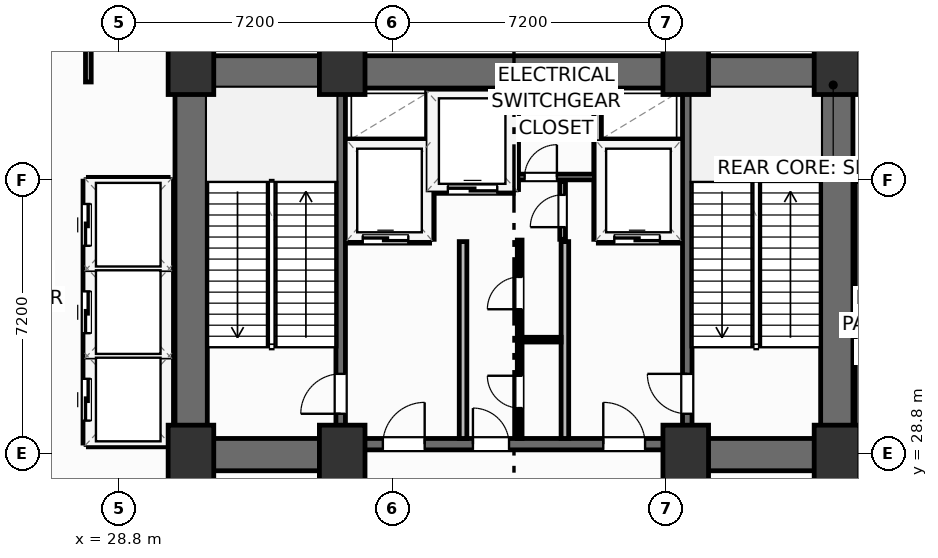
"""IFC4 building model, lengths in metres.
Left out: names, types, materials, properties, quantities, classifications, styles, units other than length and angle.
Written with IfcOpenShell. Run it as: python <this file> out.ifc"""

import sys

from ifc_helpers import new_model, si_unit, direction, frame, frame_2d, origin, origin_2d, place, context, subcontext, project, spatial, rectangle, extrude, element, fill, save


model = new_model("IFC4")
c1 = context("Model", 3, precision=1e-05, world=origin(), true_north=direction((0.0, 1.0)))
c2 = subcontext(c1, "Body", "Model", "MODEL_VIEW")
j1 = project(units=[si_unit("LENGTHUNIT", "METRE"), si_unit("PLANEANGLEUNIT", "RADIAN")], contexts=[c1])
p1 = place(None, origin())
s1 = spatial("IfcSite", under=j1, at=p1, CompositionType="ELEMENT")
p2 = place(p1, origin())
s2 = spatial("IfcBuilding", under=s1, at=p2, CompositionType="ELEMENT")
p3 = place(p2, frame((0.0, 0.0, 10.8)))
s3 = spatial("IfcBuildingStorey", under=s2, at=p3, CompositionType="ELEMENT", Elevation=10.8)
for number, where, z_axis, x_axis in (
    (1, (30.7, 28.75, 0.0), (0.0, 0.0, 1.0), (1.0, 0.0, 0.0)),
    (2, (34.68, 28.75, 0.0), (0.0, 0.0, 1.0), (1.0, 0.0, 0.0)),
    (3, (43.72, 28.75, 0.0), (0.0, 0.0, 1.0), (1.0, 0.0, 0.0)),
    (4, (47.7, 28.75, 0.0), (0.0, 0.0, 1.0), (1.0, 0.0, 0.0)),
    (5, (30.7, 39.05, 0.0), (0.0, 0.0, 1.0), (1.0, 0.0, 0.0)),
    (6, (34.68, 39.05, 0.0), (0.0, 0.0, 1.0), (1.0, 0.0, 0.0)),
    (7, (43.72, 39.05, 0.0), (0.0, 0.0, 1.0), (1.0, 0.0, 0.0)),
    (8, (47.7, 39.05, 0.0), (0.0, 0.0, 1.0), (1.0, 0.0, 0.0)),
):
    element("IfcColumn", number, at=place(p3, frame(where, z_axis=z_axis, x_axis=x_axis)), inside=s3, PredefinedType="COLUMN", context=c2, shape_type="SweptSolid", body=[
        extrude(rectangle(XDim=1.2, YDim=1.6, at=origin_2d()), origin(), (0.0, 0.0, 1.0), 5.4),
    ])
p4 = place(p3, frame((30.28, 38.845, 0.0), z_axis=(0.0, 0.0, 1.0), x_axis=(1.0, 0.0, 0.0)))
e9 = element("IfcWall", 9, at=p4, inside=s3, PredefinedType="SHEAR", context=c2, shape_type="SweptSolid", body=[
    extrude(rectangle(XDim=17.84, YDim=0.85, at=frame_2d((8.92, 0.0))), origin(), (0.0, 0.0, 1.0), 5.12),
])
for number, where, z_axis, x_axis in (
    (10, (30.705, 29.2, 0.0), (0.0, 0.0, 1.0), (0.0, 1.0, 0.0)),
    (11, (47.695, 29.2, 0.0), (0.0, 0.0, 1.0), (0.0, 1.0, 0.0)),
):
    element("IfcWall", number, at=place(p3, frame(where, z_axis=z_axis, x_axis=x_axis)), inside=s3, PredefinedType="SHEAR", context=c2, shape_type="SweptSolid", body=[
        extrude(rectangle(XDim=9.22, YDim=0.85, at=frame_2d((4.61, 0.0))), origin(), (0.0, 0.0, 1.0), 5.12),
    ])
for number, where, z_axis, x_axis in (
    (12, (30.28, 28.775, 0.0), (0.0, 0.0, 1.0), (1.0, 0.0, 0.0)),
    (13, (43.6, 28.775, 0.0), (0.0, 0.0, 1.0), (1.0, 0.0, 0.0)),
):
    element("IfcWall", number, at=place(p3, frame(where, z_axis=z_axis, x_axis=x_axis)), inside=s3, PredefinedType="SHEAR", context=c2, shape_type="SweptSolid", body=[
        extrude(rectangle(XDim=4.52, YDim=0.85, at=frame_2d((2.26, 0.0))), origin(), (0.0, 0.0, 1.0), 5.12),
    ])
p5 = place(p3, frame((34.8, 29.05, 0.0), z_axis=(0.0, 0.0, 1.0), x_axis=(1.0, 0.0, 0.0)))
e14 = element("IfcWall", 14, at=p5, inside=s3, PredefinedType="SHEAR", context=c2, shape_type="SweptSolid", body=[
    extrude(rectangle(XDim=8.8, YDim=0.3, at=frame_2d((4.4, 0.0))), origin(), (0.0, 0.0, 1.0), 5.12),
])
p6 = place(p5, frame((0.95, 0.0, 0.0)))
e15 = element("IfcOpeningElement", 15, at=p6, cuts=e14, PredefinedType="OPENING", context=c2, shape_type="SweptSolid", body=[
    extrude(rectangle(XDim=1.1, YDim=2.15, at=frame_2d((0.55, 1.075))), frame((0.0, 0.16, 0.0), z_axis=(0.0, -1.0, 0.0), x_axis=(1.0, 0.0, 0.0)), (0.0, 0.0, 1.0), 0.32),
])
p7 = place(p5, frame((6.75, 0.0, 0.0)))
e16 = element("IfcOpeningElement", 16, at=p7, cuts=e14, PredefinedType="OPENING", context=c2, shape_type="SweptSolid", body=[
    extrude(rectangle(XDim=1.1, YDim=2.15, at=frame_2d((0.55, 1.075))), frame((0.0, 0.16, 0.0), z_axis=(0.0, -1.0, 0.0), x_axis=(1.0, 0.0, 0.0)), (0.0, 0.0, 1.0), 0.32),
])
p8 = place(p5, frame((3.32, 0.0, 0.0)))
e17 = element("IfcOpeningElement", 17, at=p8, cuts=e14, PredefinedType="OPENING", context=c2, shape_type="SweptSolid", body=[
    extrude(rectangle(XDim=0.95, YDim=2.15, at=frame_2d((0.475, 1.075))), frame((0.0, 0.16, 0.0), z_axis=(0.0, -1.0, 0.0), x_axis=(1.0, 0.0, 0.0)), (0.0, 0.0, 1.0), 0.32),
])
p9 = place(p3, frame((34.64, 29.2, 0.0), z_axis=(0.0, 0.0, 1.0), x_axis=(0.0, 1.0, 0.0)))
e18 = element("IfcWall", 18, at=p9, inside=s3, PredefinedType="SHEAR", context=c2, shape_type="SweptSolid", body=[
    extrude(rectangle(XDim=9.22, YDim=0.25, at=frame_2d((4.61, 0.0))), origin(), (0.0, 0.0, 1.0), 5.12),
])
p10 = place(p9, frame((0.65, 0.0, 0.0)))
e19 = element("IfcOpeningElement", 19, at=p10, cuts=e18, PredefinedType="OPENING", context=c2, shape_type="SweptSolid", body=[
    extrude(rectangle(XDim=1.05, YDim=2.15, at=frame_2d((0.525, 1.075))), frame((0.0, 0.135, 0.0), z_axis=(0.0, -1.0, 0.0), x_axis=(1.0, 0.0, 0.0)), (0.0, 0.0, 1.0), 0.27),
])
p11 = place(p3, frame((43.76, 29.2, 0.0), z_axis=(0.0, 0.0, 1.0), x_axis=(0.0, 1.0, 0.0)))
e20 = element("IfcWall", 20, at=p11, inside=s3, PredefinedType="SHEAR", context=c2, shape_type="SweptSolid", body=[
    extrude(rectangle(XDim=9.22, YDim=0.25, at=frame_2d((4.61, 0.0))), origin(), (0.0, 0.0, 1.0), 5.12),
])
p12 = place(p11, frame((0.65, 0.0, 0.0)))
e21 = element("IfcOpeningElement", 21, at=p12, cuts=e20, PredefinedType="OPENING", context=c2, shape_type="SweptSolid", body=[
    extrude(rectangle(XDim=1.05, YDim=2.15, at=frame_2d((0.525, 1.075))), frame((0.0, 0.135, 0.0), z_axis=(0.0, -1.0, 0.0), x_axis=(1.0, 0.0, 0.0)), (0.0, 0.0, 1.0), 0.27),
])
p13 = place(p3, frame((48.12, 38.58, 0.0), z_axis=(0.0, 0.0, 1.0), x_axis=(1.0, 0.0, 0.0)))
e22 = element("IfcWall", 22, at=p13, inside=s3, PredefinedType="PARTITIONING", context=c2, shape_type="SweptSolid", body=[
    extrude(rectangle(XDim=2.4, YDim=0.15, at=frame_2d((1.2, 0.0))), origin(), (0.0, 0.0, 1.0), 4.085),
])
p14 = place(p3, frame((28.0, 38.58, 0.0), z_axis=(0.0, 0.0, 1.0), x_axis=(0.0, 1.0, 0.0)))
e23 = element("IfcWall", 23, at=p14, inside=s3, PredefinedType="PARTITIONING", context=c2, shape_type="SweptSolid", body=[
    extrude(rectangle(XDim=11.62, YDim=0.15, at=frame_2d((5.81, 0.0))), origin(), (0.0, 0.0, 1.0), 5.12),
])
for number, where, z_axis, x_axis in (
    (24, (37.86, 29.2, 0.0), (0.0, 0.0, 1.0), (0.0, 1.0, 0.0)),
    (25, (40.54, 29.2, 0.0), (0.0, 0.0, 1.0), (0.0, 1.0, 0.0)),
):
    element("IfcWall", number, at=place(p3, frame(where, z_axis=z_axis, x_axis=x_axis)), inside=s3, PredefinedType="PARTITIONING", context=c2, shape_type="SweptSolid", body=[
        extrude(rectangle(XDim=5.18, YDim=0.2, at=frame_2d((2.59, 0.0))), origin(), (0.0, 0.0, 1.0), 5.12),
    ])
p15 = place(p3, frame((34.8, 34.44, 0.0), z_axis=(0.0, 0.0, 1.0), x_axis=(1.0, 0.0, 0.0)))
e26 = element("IfcWall", 26, at=p15, inside=s3, PredefinedType="PARTITIONING", context=c2, shape_type="SweptSolid", body=[
    extrude(rectangle(XDim=2.18, YDim=0.2, at=frame_2d((1.09, 0.0))), origin(), (0.0, 0.0, 1.0), 5.12),
])
p16 = place(p15, frame((0.42, 0.0, 0.0)))
e27 = element("IfcOpeningElement", 27, at=p16, cuts=e26, PredefinedType="OPENING", context=c2, shape_type="SweptSolid", body=[
    extrude(rectangle(XDim=1.2, YDim=2.2, at=frame_2d((0.6, 1.1))), frame((0.0, 0.11, 0.0), z_axis=(0.0, -1.0, 0.0), x_axis=(1.0, 0.0, 0.0)), (0.0, 0.0, 1.0), 0.22),
])
p17 = place(p3, frame((34.8, 36.98, 0.0), z_axis=(0.0, 0.0, 1.0), x_axis=(1.0, 0.0, 0.0)))
e28 = element("IfcWall", 28, at=p17, inside=s3, PredefinedType="PARTITIONING", context=c2, shape_type="SweptSolid", body=[
    extrude(rectangle(XDim=2.18, YDim=0.2, at=frame_2d((1.09, 0.0))), origin(), (0.0, 0.0, 1.0), 5.12),
])
p18 = place(p3, frame((37.0, 34.44, 0.0), z_axis=(0.0, 0.0, 1.0), x_axis=(0.0, 1.0, 0.0)))
e29 = element("IfcWall", 29, at=p18, inside=s3, PredefinedType="PARTITIONING", context=c2, shape_type="SweptSolid", body=[
    extrude(rectangle(XDim=3.9, YDim=0.2, at=frame_2d((1.95, 0.0))), origin(), (0.0, 0.0, 1.0), 5.12),
])
p19 = place(p3, frame((41.42, 34.44, 0.0), z_axis=(0.0, 0.0, 1.0), x_axis=(1.0, 0.0, 0.0)))
e30 = element("IfcWall", 30, at=p19, inside=s3, PredefinedType="PARTITIONING", context=c2, shape_type="SweptSolid", body=[
    extrude(rectangle(XDim=2.18, YDim=0.2, at=frame_2d((1.09, 0.0))), origin(), (0.0, 0.0, 1.0), 5.12),
])
p20 = place(p19, frame((0.42, 0.0, 0.0)))
e31 = element("IfcOpeningElement", 31, at=p20, cuts=e30, PredefinedType="OPENING", context=c2, shape_type="SweptSolid", body=[
    extrude(rectangle(XDim=1.2, YDim=2.2, at=frame_2d((0.6, 1.1))), frame((0.0, 0.11, 0.0), z_axis=(0.0, -1.0, 0.0), x_axis=(1.0, 0.0, 0.0)), (0.0, 0.0, 1.0), 0.22),
])
p21 = place(p3, frame((41.42, 36.98, 0.0), z_axis=(0.0, 0.0, 1.0), x_axis=(1.0, 0.0, 0.0)))
e32 = element("IfcWall", 32, at=p21, inside=s3, PredefinedType="PARTITIONING", context=c2, shape_type="SweptSolid", body=[
    extrude(rectangle(XDim=2.18, YDim=0.2, at=frame_2d((1.09, 0.0))), origin(), (0.0, 0.0, 1.0), 5.12),
])
p22 = place(p3, frame((41.4, 34.44, 0.0), z_axis=(0.0, 0.0, 1.0), x_axis=(0.0, 1.0, 0.0)))
e33 = element("IfcWall", 33, at=p22, inside=s3, PredefinedType="PARTITIONING", context=c2, shape_type="SweptSolid", body=[
    extrude(rectangle(XDim=3.9, YDim=0.2, at=frame_2d((1.95, 0.0))), origin(), (0.0, 0.0, 1.0), 5.12),
])
p23 = place(p3, frame((37.06, 35.75, 0.0), z_axis=(0.0, 0.0, 1.0), x_axis=(1.0, 0.0, 0.0)))
e34 = element("IfcWall", 34, at=p23, inside=s3, PredefinedType="PARTITIONING", context=c2, shape_type="SweptSolid", body=[
    extrude(rectangle(XDim=2.12, YDim=0.2, at=frame_2d((1.06, 0.0))), origin(), (0.0, 0.0, 1.0), 5.12),
])
p24 = place(p23, frame((0.4, 0.0, 0.0)))
e35 = element("IfcOpeningElement", 35, at=p24, cuts=e34, PredefinedType="OPENING", context=c2, shape_type="SweptSolid", body=[
    extrude(rectangle(XDim=1.3, YDim=2.2, at=frame_2d((0.65, 1.1))), frame((0.0, 0.11, 0.0), z_axis=(0.0, -1.0, 0.0), x_axis=(1.0, 0.0, 0.0)), (0.0, 0.0, 1.0), 0.22),
])
p25 = place(p3, frame((39.22, 35.75, 0.0), z_axis=(0.0, 0.0, 1.0), x_axis=(0.0, 1.0, 0.0)))
e36 = element("IfcWall", 36, at=p25, inside=s3, PredefinedType="PARTITIONING", context=c2, shape_type="SweptSolid", body=[
    extrude(rectangle(XDim=2.59, YDim=0.2, at=frame_2d((1.295, 0.0))), origin(), (0.0, 0.0, 1.0), 5.12),
])
p26 = place(p3, frame((39.3, 36.08, 0.0), z_axis=(0.0, 0.0, 1.0), x_axis=(1.0, 0.0, 0.0)))
e37 = element("IfcWall", 37, at=p26, inside=s3, PredefinedType="PARTITIONING", context=c2, shape_type="SweptSolid", body=[
    extrude(rectangle(XDim=2.02, YDim=0.15, at=frame_2d((1.01, 0.0))), origin(), (0.0, 0.0, 1.0), 5.12),
])
p27 = place(p26, frame((0.18, 0.0, 0.0)))
e38 = element("IfcOpeningElement", 38, at=p27, cuts=e37, PredefinedType="OPENING", context=c2, shape_type="SweptSolid", body=[
    extrude(rectangle(XDim=0.85, YDim=2.05, at=frame_2d((0.425, 1.025))), frame((0.0, 0.085, 0.0), z_axis=(0.0, -1.0, 0.0), x_axis=(1.0, 0.0, 0.0)), (0.0, 0.0, 1.0), 0.17),
])
p28 = place(p3, frame((40.48, 34.44, 0.0), z_axis=(0.0, 0.0, 1.0), x_axis=(0.0, 1.0, 0.0)))
e39 = element("IfcWall", 39, at=p28, inside=s3, PredefinedType="PARTITIONING", context=c2, shape_type="SweptSolid", body=[
    extrude(rectangle(XDim=1.52, YDim=0.15, at=frame_2d((0.76, 0.0))), origin(), (0.0, 0.0, 1.0), 5.12),
])
p29 = place(p28, frame((0.32, 0.0, 0.0)))
e40 = element("IfcOpeningElement", 40, at=p29, cuts=e39, PredefinedType="OPENING", context=c2, shape_type="SweptSolid", body=[
    extrude(rectangle(XDim=0.85, YDim=2.05, at=frame_2d((0.425, 1.025))), frame((0.0, 0.085, 0.0), z_axis=(0.0, -1.0, 0.0), x_axis=(1.0, 0.0, 0.0)), (0.0, 0.0, 1.0), 0.17),
])
p30 = place(p3, frame((39.35, 31.8, 0.0), z_axis=(0.0, 0.0, 1.0), x_axis=(1.0, 0.0, 0.0)))
e41 = element("IfcWall", 41, at=p30, inside=s3, PredefinedType="PARTITIONING", context=c2, shape_type="SweptSolid", body=[
    extrude(rectangle(XDim=1.09, YDim=0.125, at=frame_2d((0.545, 0.0))), origin(), (0.0, 0.0, 1.0), 5.12),
])
p31 = place(p3, frame((39.35, 29.2, 0.0), z_axis=(0.0, 0.0, 1.0), x_axis=(0.0, 1.0, 0.0)))
e42 = element("IfcWall", 42, at=p31, inside=s3, PredefinedType="PARTITIONING", context=c2, shape_type="SweptSolid", body=[
    extrude(rectangle(XDim=5.22, YDim=0.125, at=frame_2d((2.61, 0.0))), origin(), (0.0, 0.0, 1.0), 5.12),
])
p32 = place(p31, frame((0.8, 0.0, 0.0)))
e43 = element("IfcOpeningElement", 43, at=p32, cuts=e42, PredefinedType="OPENING", context=c2, shape_type="SweptSolid", body=[
    extrude(rectangle(XDim=0.85, YDim=2.05, at=frame_2d((0.425, 1.025))), frame((0.0, 0.073, 0.0), z_axis=(0.0, -1.0, 0.0), x_axis=(1.0, 0.0, 0.0)), (0.0, 0.0, 1.0), 0.145),
])
p33 = place(p31, frame((3.4, 0.0, 0.0)))
e44 = element("IfcOpeningElement", 44, at=p33, cuts=e42, PredefinedType="OPENING", context=c2, shape_type="SweptSolid", body=[
    extrude(rectangle(XDim=0.85, YDim=2.05, at=frame_2d((0.425, 1.025))), frame((0.0, 0.073, 0.0), z_axis=(0.0, -1.0, 0.0), x_axis=(1.0, 0.0, 0.0)), (0.0, 0.0, 1.0), 0.145),
])
for number, where, z_axis, x_axis in (
    (45, (28.02, 31.375, 0.0), (0.0, 0.0, 1.0), (1.0, 0.0, 0.0)),
    (46, (28.02, 33.675, 0.0), (0.0, 0.0, 1.0), (1.0, 0.0, 0.0)),
):
    element("IfcWall", number, at=place(p3, frame(where, z_axis=z_axis, x_axis=x_axis)), inside=s3, PredefinedType="PARTITIONING", context=c2, shape_type="SweptSolid", body=[
        extrude(rectangle(XDim=2.06, YDim=0.2, at=frame_2d((1.03, 0.0))), origin(), (0.0, 0.0, 1.0), 5.12),
    ])
for number, where, z_axis, x_axis in (
    (47, (28.0, 29.08, 0.0), (0.0, 0.0, 1.0), (1.0, 0.0, 0.0)),
    (48, (28.0, 35.97, 0.0), (0.0, 0.0, 1.0), (1.0, 0.0, 0.0)),
):
    element("IfcWall", number, at=place(p3, frame(where, z_axis=z_axis, x_axis=x_axis)), inside=s3, PredefinedType="PARTITIONING", context=c2, shape_type="SweptSolid", body=[
        extrude(rectangle(XDim=2.1, YDim=0.2, at=frame_2d((1.05, 0.0))), origin(), (0.0, 0.0, 1.0), 5.12),
    ])
p34 = place(p3, frame((30.12, 29.08, 0.0), z_axis=(0.0, 0.0, 1.0), x_axis=(0.0, 1.0, 0.0)))
e49 = element("IfcWall", 49, at=p34, inside=s3, PredefinedType="PARTITIONING", context=c2, shape_type="SweptSolid", body=[
    extrude(rectangle(XDim=6.89, YDim=0.2, at=frame_2d((3.445, 0.0))), origin(), (0.0, 0.0, 1.0), 5.12),
])
p35 = place(p3, frame((27.96, 29.08, 0.0), z_axis=(0.0, 0.0, 1.0), x_axis=(0.0, 1.0, 0.0)))
e50 = element("IfcWall", 50, at=p35, inside=s3, PredefinedType="PARTITIONING", context=c2, shape_type="SweptSolid", body=[
    extrude(rectangle(XDim=6.89, YDim=0.2, at=frame_2d((3.445, 0.0))), origin(), (0.0, 0.0, 1.0), 5.12),
])
p36 = place(p35, frame((0.59, 0.0, 0.0)))
e51 = element("IfcOpeningElement", 51, at=p36, cuts=e50, PredefinedType="OPENING", context=c2, shape_type="SweptSolid", body=[
    extrude(rectangle(XDim=1.1, YDim=2.15, at=frame_2d((0.55, 1.075))), frame((0.0, 0.11, 0.0), z_axis=(0.0, -1.0, 0.0), x_axis=(1.0, 0.0, 0.0)), (0.0, 0.0, 1.0), 0.22),
])
p37 = place(p35, frame((2.89, 0.0, 0.0)))
e52 = element("IfcOpeningElement", 52, at=p37, cuts=e50, PredefinedType="OPENING", context=c2, shape_type="SweptSolid", body=[
    extrude(rectangle(XDim=1.1, YDim=2.15, at=frame_2d((0.55, 1.075))), frame((0.0, 0.11, 0.0), z_axis=(0.0, -1.0, 0.0), x_axis=(1.0, 0.0, 0.0)), (0.0, 0.0, 1.0), 0.22),
])
p38 = place(p35, frame((5.19, 0.0, 0.0)))
e53 = element("IfcOpeningElement", 53, at=p38, cuts=e50, PredefinedType="OPENING", context=c2, shape_type="SweptSolid", body=[
    extrude(rectangle(XDim=1.1, YDim=2.15, at=frame_2d((0.55, 1.075))), frame((0.0, 0.11, 0.0), z_axis=(0.0, -1.0, 0.0), x_axis=(1.0, 0.0, 0.0)), (0.0, 0.0, 1.0), 0.22),
])
p39 = place(p3, frame((48.28, 29.08, 0.0), z_axis=(0.0, 0.0, 1.0), x_axis=(0.0, 1.0, 0.0)))
e54 = element("IfcWall", 54, at=p39, inside=s3, PredefinedType="PARTITIONING", context=c2, shape_type="SweptSolid", body=[
    extrude(rectangle(XDim=6.89, YDim=0.2, at=frame_2d((3.445, 0.0))), origin(), (0.0, 0.0, 1.0), 5.12),
])
p40 = place(p10, origin())
e55 = element("IfcDoor", 55, at=p40, inside=s3, OperationType="SINGLE_SWING_LEFT", PredefinedType="DOOR", context=c2, shape_type="SweptSolid", body=[
    extrude(rectangle(XDim=1.05, YDim=2.15, at=frame_2d((0.525, 1.075))), frame((0.0, 0.025, 0.0), z_axis=(0.0, -1.0, 0.0), x_axis=(1.0, 0.0, 0.0)), (0.0, 0.0, 1.0), 0.05),
])
fill(e19, e55)
p41 = place(p12, origin())
e56 = element("IfcDoor", 56, at=p41, inside=s3, OperationType="SINGLE_SWING_RIGHT", PredefinedType="DOOR", context=c2, shape_type="SweptSolid", body=[
    extrude(rectangle(XDim=1.05, YDim=2.15, at=frame_2d((0.525, 1.075))), frame((0.0, 0.025, 0.0), z_axis=(0.0, -1.0, 0.0), x_axis=(1.0, 0.0, 0.0)), (0.0, 0.0, 1.0), 0.05),
])
fill(e21, e56)
p42 = place(p6, origin())
e57 = element("IfcDoor", 57, at=p42, inside=s3, OperationType="SINGLE_SWING_RIGHT", PredefinedType="DOOR", context=c2, shape_type="SweptSolid", body=[
    extrude(rectangle(XDim=1.1, YDim=2.15, at=frame_2d((0.55, 1.075))), frame((0.0, 0.025, 0.0), z_axis=(0.0, -1.0, 0.0), x_axis=(1.0, 0.0, 0.0)), (0.0, 0.0, 1.0), 0.05),
])
fill(e15, e57)
p43 = place(p7, origin())
e58 = element("IfcDoor", 58, at=p43, inside=s3, OperationType="SINGLE_SWING_LEFT", PredefinedType="DOOR", context=c2, shape_type="SweptSolid", body=[
    extrude(rectangle(XDim=1.1, YDim=2.15, at=frame_2d((0.55, 1.075))), frame((0.0, 0.025, 0.0), z_axis=(0.0, -1.0, 0.0), x_axis=(1.0, 0.0, 0.0)), (0.0, 0.0, 1.0), 0.05),
])
fill(e16, e58)
p44 = place(p16, origin())
e59 = element("IfcDoor", 59, at=p44, inside=s3, OperationType="SLIDING_TO_LEFT", PredefinedType="DOOR", context=c2, shape_type="SweptSolid", body=[
    extrude(rectangle(XDim=1.2, YDim=2.2, at=frame_2d((0.6, 1.1))), frame((0.0, 0.025, 0.0), z_axis=(0.0, -1.0, 0.0), x_axis=(1.0, 0.0, 0.0)), (0.0, 0.0, 1.0), 0.05),
])
fill(e27, e59)
p45 = place(p20, origin())
e60 = element("IfcDoor", 60, at=p45, inside=s3, OperationType="SLIDING_TO_LEFT", PredefinedType="DOOR", context=c2, shape_type="SweptSolid", body=[
    extrude(rectangle(XDim=1.2, YDim=2.2, at=frame_2d((0.6, 1.1))), frame((0.0, 0.025, 0.0), z_axis=(0.0, -1.0, 0.0), x_axis=(1.0, 0.0, 0.0)), (0.0, 0.0, 1.0), 0.05),
])
fill(e31, e60)
p46 = place(p24, origin())
e61 = element("IfcDoor", 61, at=p46, inside=s3, OperationType="SLIDING_TO_LEFT", PredefinedType="DOOR", context=c2, shape_type="SweptSolid", body=[
    extrude(rectangle(XDim=1.3, YDim=2.2, at=frame_2d((0.65, 1.1))), frame((0.0, 0.025, 0.0), z_axis=(0.0, -1.0, 0.0), x_axis=(1.0, 0.0, 0.0)), (0.0, 0.0, 1.0), 0.05),
])
fill(e35, e61)
p47 = place(p27, origin())
e62 = element("IfcDoor", 62, at=p47, inside=s3, OperationType="SINGLE_SWING_RIGHT", PredefinedType="DOOR", context=c2, shape_type="SweptSolid", body=[
    extrude(rectangle(XDim=0.85, YDim=2.05, at=frame_2d((0.425, 1.025))), frame((0.0, 0.025, 0.0), z_axis=(0.0, -1.0, 0.0), x_axis=(1.0, 0.0, 0.0)), (0.0, 0.0, 1.0), 0.05),
])
fill(e38, e62)
p48 = place(p29, origin())
e63 = element("IfcDoor", 63, at=p48, inside=s3, OperationType="SINGLE_SWING_LEFT", PredefinedType="DOOR", context=c2, shape_type="SweptSolid", body=[
    extrude(rectangle(XDim=0.85, YDim=2.05, at=frame_2d((0.425, 1.025))), frame((0.0, 0.025, 0.0), z_axis=(0.0, -1.0, 0.0), x_axis=(1.0, 0.0, 0.0)), (0.0, 0.0, 1.0), 0.05),
])
fill(e40, e63)
p49 = place(p32, origin())
e64 = element("IfcDoor", 64, at=p49, inside=s3, OperationType="SINGLE_SWING_RIGHT", PredefinedType="DOOR", context=c2, shape_type="SweptSolid", body=[
    extrude(rectangle(XDim=0.85, YDim=2.05, at=frame_2d((0.425, 1.025))), frame((0.0, 0.025, 0.0), z_axis=(0.0, -1.0, 0.0), x_axis=(1.0, 0.0, 0.0)), (0.0, 0.0, 1.0), 0.05),
])
fill(e43, e64)
p50 = place(p33, origin())
e65 = element("IfcDoor", 65, at=p50, inside=s3, OperationType="SINGLE_SWING_LEFT", PredefinedType="DOOR", context=c2, shape_type="SweptSolid", body=[
    extrude(rectangle(XDim=0.85, YDim=2.05, at=frame_2d((0.425, 1.025))), frame((0.0, 0.025, 0.0), z_axis=(0.0, -1.0, 0.0), x_axis=(1.0, 0.0, 0.0)), (0.0, 0.0, 1.0), 0.05),
])
fill(e44, e65)
p51 = place(p8, origin())
e66 = element("IfcDoor", 66, at=p51, inside=s3, OperationType="SINGLE_SWING_LEFT", PredefinedType="DOOR", context=c2, shape_type="SweptSolid", body=[
    extrude(rectangle(XDim=0.95, YDim=2.15, at=frame_2d((0.475, 1.075))), frame((0.0, 0.025, 0.0), z_axis=(0.0, -1.0, 0.0), x_axis=(1.0, 0.0, 0.0)), (0.0, 0.0, 1.0), 0.05),
])
fill(e17, e66)
p52 = place(p36, origin())
e67 = element("IfcDoor", 67, at=p52, inside=s3, OperationType="SLIDING_TO_LEFT", PredefinedType="DOOR", context=c2, shape_type="SweptSolid", body=[
    extrude(rectangle(XDim=1.1, YDim=2.15, at=frame_2d((0.55, 1.075))), frame((0.0, 0.025, 0.0), z_axis=(0.0, -1.0, 0.0), x_axis=(1.0, 0.0, 0.0)), (0.0, 0.0, 1.0), 0.05),
])
fill(e51, e67)
p53 = place(p37, origin())
e68 = element("IfcDoor", 68, at=p53, inside=s3, OperationType="SLIDING_TO_LEFT", PredefinedType="DOOR", context=c2, shape_type="SweptSolid", body=[
    extrude(rectangle(XDim=1.1, YDim=2.15, at=frame_2d((0.55, 1.075))), frame((0.0, 0.025, 0.0), z_axis=(0.0, -1.0, 0.0), x_axis=(1.0, 0.0, 0.0)), (0.0, 0.0, 1.0), 0.05),
])
fill(e52, e68)
p54 = place(p38, origin())
e69 = element("IfcDoor", 69, at=p54, inside=s3, OperationType="SLIDING_TO_LEFT", PredefinedType="DOOR", context=c2, shape_type="SweptSolid", body=[
    extrude(rectangle(XDim=1.1, YDim=2.15, at=frame_2d((0.55, 1.075))), frame((0.0, 0.025, 0.0), z_axis=(0.0, -1.0, 0.0), x_axis=(1.0, 0.0, 0.0)), (0.0, 0.0, 1.0), 0.05),
])
fill(e53, e69)
save(model, sys.argv[1])
